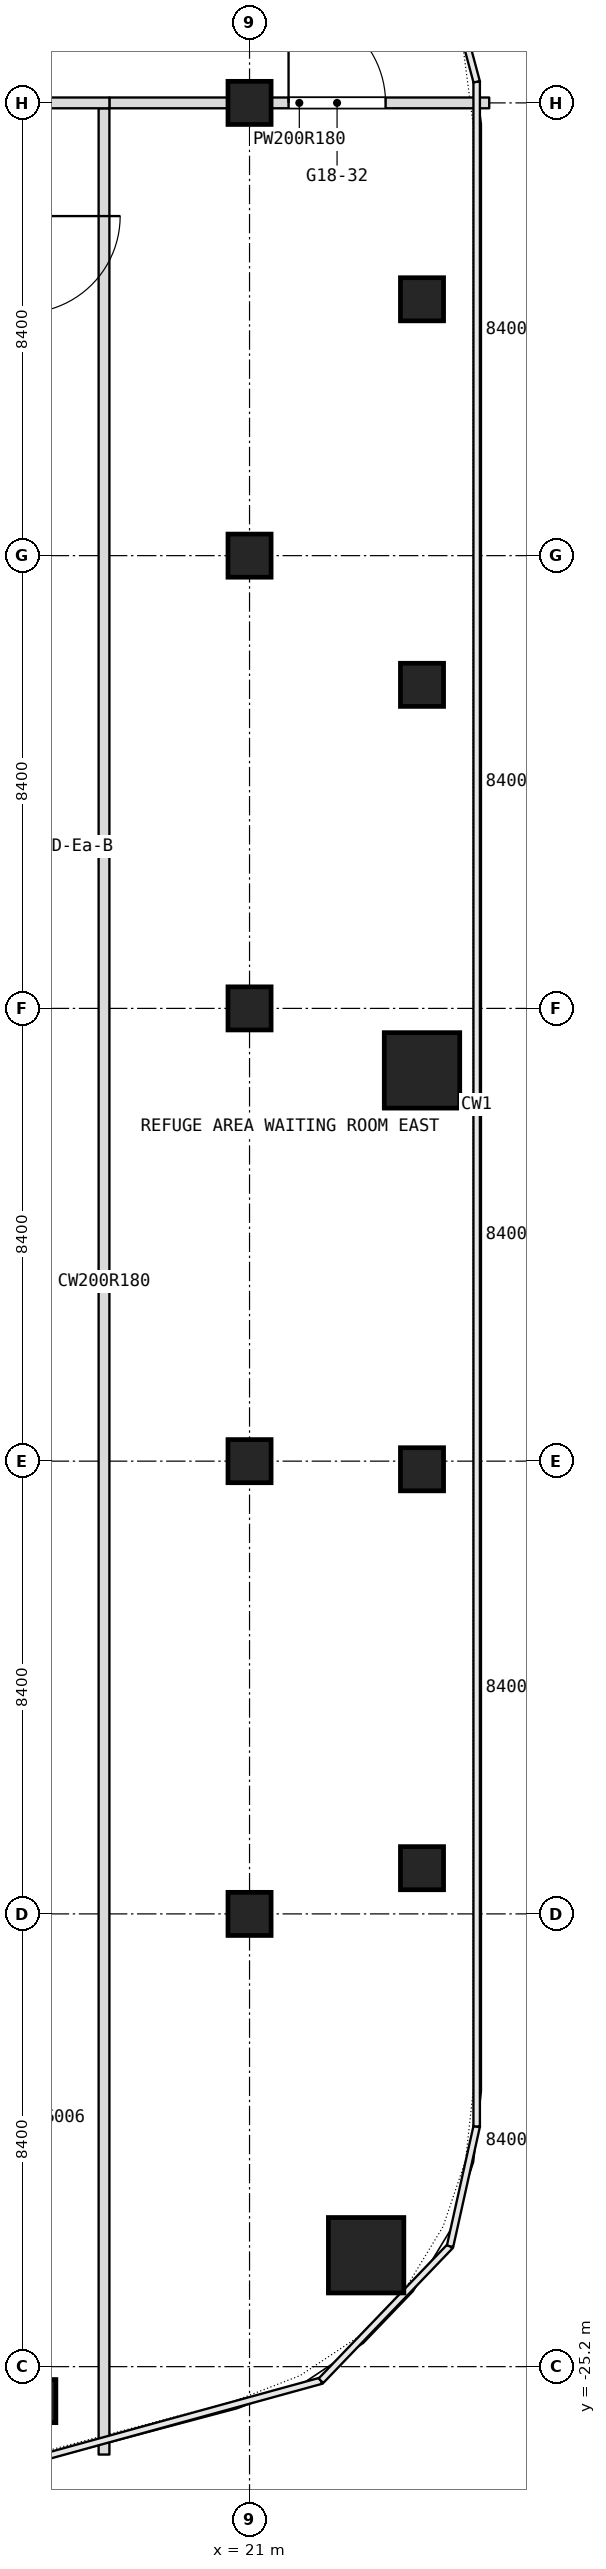
"""IFC4 building model, lengths in metres.
Left out: names, types, materials, properties, quantities, classifications, styles, units other than length and angle.
Written with IfcOpenShell. Run it as: python <this file> out.ifc"""

import sys

from ifc_helpers import new_model, si_unit, direction, frame, frame_2d, origin, origin_2d, place, context, subcontext, project, spatial, rectangle, extrude, element, fill, save


model = new_model("IFC4")
c1 = context("Model", 3, precision=1e-05, world=origin(), true_north=direction((0.0, 1.0)))
c2 = subcontext(c1, "Body", "Model", "MODEL_VIEW")
j1 = project(units=[si_unit("LENGTHUNIT", "METRE"), si_unit("PLANEANGLEUNIT", "RADIAN")], contexts=[c1])
p1 = place(None, origin())
s1 = spatial("IfcSite", under=j1, at=p1, CompositionType="ELEMENT")
p2 = place(p1, origin())
s2 = spatial("IfcBuilding", under=s1, at=p2, CompositionType="ELEMENT")
p3 = place(p2, frame((0.0, 0.0, 216.5)))
s3 = spatial("IfcBuildingStorey", under=s2, at=p3, CompositionType="ELEMENT", Elevation=216.5)
for number, where, z_axis, x_axis in (
    (1, (23.163, -23.133, 0.0), (0.0, 0.0, 1.0), (1.0, 0.0, 0.0)),
    (2, (24.2, -1.15, 0.0), (0.0, 0.0, 1.0), (1.0, 0.0, 0.0)),
):
    element("IfcColumn", number, at=place(p3, frame(where, z_axis=z_axis, x_axis=x_axis)), inside=s3, PredefinedType="COLUMN", context=c2, shape_type="SweptSolid", body=[
        extrude(rectangle(XDim=1.4, YDim=1.4, at=origin_2d()), origin(), (0.0, 0.0, 1.0), 3.6),
    ])
for number, where, z_axis, x_axis in (
    (3, (21.0, -16.8, 0.0), (0.0, 0.0, 1.0), (1.0, 0.0, 0.0)),
    (4, (21.0, -8.4, 0.0), (0.0, 0.0, 1.0), (1.0, 0.0, 0.0)),
    (5, (21.0, 0.0, 0.0), (0.0, 0.0, 1.0), (1.0, 0.0, 0.0)),
    (6, (21.0, 8.4, 0.0), (0.0, 0.0, 1.0), (1.0, 0.0, 0.0)),
    (7, (21.0, 16.8, 0.0), (0.0, 0.0, 1.0), (1.0, 0.0, 0.0)),
    (8, (24.2, 13.156, 0.0), (0.0, 0.0, 1.0), (1.0, 0.0, 0.0)),
    (9, (24.2, 6.003, 0.0), (0.0, 0.0, 1.0), (1.0, 0.0, 0.0)),
    (10, (24.2, -8.551, 0.0), (0.0, 0.0, 1.0), (1.0, 0.0, 0.0)),
    (11, (24.2, -15.952, 0.0), (0.0, 0.0, 1.0), (1.0, 0.0, 0.0)),
    (12, (17.007, -25.839, 0.0), (0.0, 0.0, 1.0), (1.0, 0.0, 0.0)),
):
    element("IfcColumn", number, at=place(p3, frame(where, z_axis=z_axis, x_axis=x_axis)), inside=s3, PredefinedType="COLUMN", context=c2, shape_type="SweptSolid", body=[
        extrude(rectangle(XDim=0.8, YDim=0.8, at=origin_2d()), origin(), (0.0, 0.0, 1.0), 3.6),
    ])
p4 = place(p3, frame((18.3, -26.831, 0.0), z_axis=(0.0, 0.0, 1.0), x_axis=(0.0, 1.0, 0.0)))
e13 = element("IfcWall", 13, at=p4, inside=s3, PredefinedType="PARTITIONING", context=c2, shape_type="SweptSolid", body=[
    extrude(rectangle(XDim=43.531, YDim=0.2, at=frame_2d((21.766, 0.0))), origin(), (0.0, 0.0, 1.0), 3.34),
])
p5 = place(p3, frame((18.4, 16.8, 0.0), z_axis=(0.0, 0.0, 1.0), x_axis=(1.0, 0.0, 0.0)))
e14 = element("IfcWall", 14, at=p5, inside=s3, PredefinedType="PARTITIONING", context=c2, shape_type="SweptSolid", body=[
    extrude(rectangle(XDim=7.047, YDim=0.2, at=frame_2d((3.523, 0.0))), origin(), (0.0, 0.0, 1.0), 2.94),
])
p6 = place(p5, frame((3.324, 0.0, 0.0)))
e15 = element("IfcOpeningElement", 15, at=p6, cuts=e14, PredefinedType="OPENING", context=c2, shape_type="SweptSolid", body=[
    extrude(rectangle(XDim=1.8, YDim=2.1, at=frame_2d((0.9, 1.05))), frame((0.0, 0.1, 0.0), z_axis=(0.0, -1.0, 0.0), x_axis=(1.0, 0.0, 0.0)), (0.0, 0.0, 1.0), 0.2),
])
p7 = place(p3, frame((16.9, 16.8, 0.0), z_axis=(0.0, 0.0, 1.0), x_axis=(1.0, 0.0, 0.0)))
e16 = element("IfcWall", 16, at=p7, inside=s3, PredefinedType="PARTITIONING", context=c2, shape_type="SweptSolid", body=[
    extrude(rectangle(XDim=1.5, YDim=0.2, at=frame_2d((0.75, 0.0))), origin(), (0.0, 0.0, 1.0), 2.94),
])
p8 = place(p6, origin())
e17 = element("IfcDoor", 17, at=p8, inside=s3, OperationType="DOUBLE_DOOR_SINGLE_SWING", PredefinedType="DOOR", context=c2, shape_type="SweptSolid", body=[
    extrude(rectangle(XDim=1.8, YDim=2.1, at=frame_2d((0.9, 1.05))), frame((0.0, 0.025, 0.0), z_axis=(0.0, -1.0, 0.0), x_axis=(1.0, 0.0, 0.0)), (0.0, 0.0, 1.0), 0.05),
])
fill(e15, e17)
save(model, sys.argv[1])
